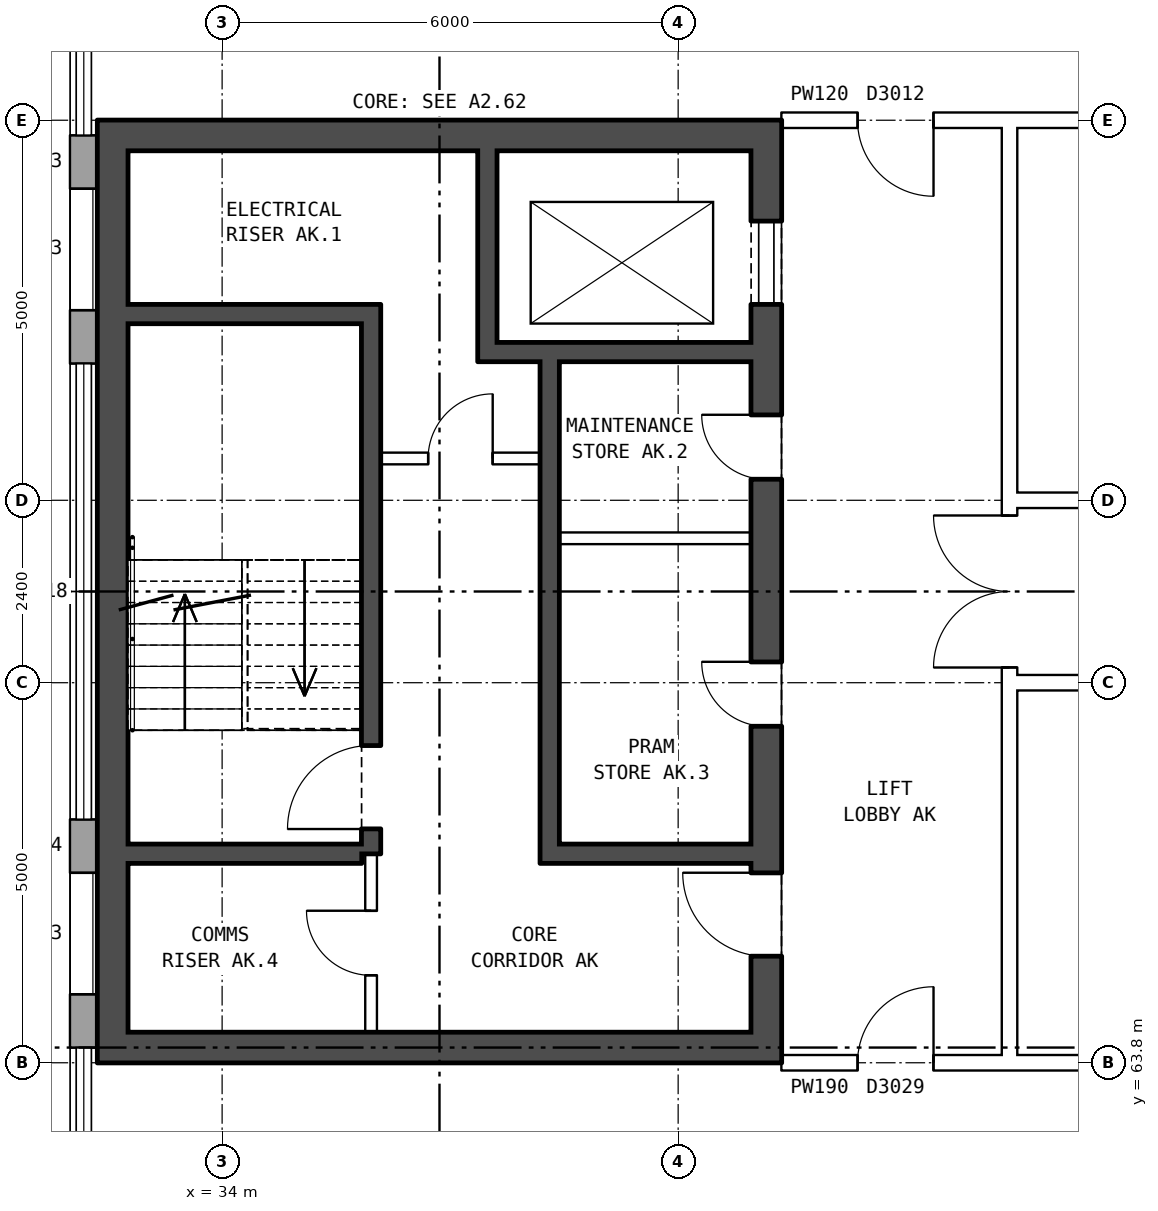
"""IFC4 building model, lengths in metres.
Left out: names, types, materials, properties, quantities, classifications, styles, units other than length and angle.
Written with IfcOpenShell. Run it as: python <this file> out.ifc"""

import sys

from ifc_helpers import new_model, si_unit, direction, frame, frame_2d, origin, place, context, subcontext, project, spatial, rectangle, extrude, element, fill, save


model = new_model("IFC4")
c1 = context("Model", 3, precision=1e-05, world=origin(), true_north=direction((0.0, 1.0)))
c2 = subcontext(c1, "Body", "Model", "MODEL_VIEW")
j1 = project(units=[si_unit("LENGTHUNIT", "METRE"), si_unit("PLANEANGLEUNIT", "RADIAN")], contexts=[c1])
p1 = place(None, origin())
s1 = spatial("IfcSite", under=j1, at=p1, CompositionType="ELEMENT")
p2 = place(p1, origin())
s2 = spatial("IfcBuilding", under=s1, at=p2, CompositionType="ELEMENT")
p3 = place(p2, frame((0.0, 0.0, 215.2)))
s3 = spatial("IfcBuildingStorey", under=s2, at=p3, CompositionType="ELEMENT", Elevation=215.2)
p4 = place(p3, frame((32.18, 76.0, 0.0), z_axis=(0.0, 0.0, 1.0), x_axis=(0.0, -1.0, 0.0)))
e1 = element("IfcWall", 1, at=p4, inside=s3, PredefinedType="STANDARD", context=c2, shape_type="SweptSolid", body=[
    extrude(rectangle(XDim=3.0, YDim=0.36, at=frame_2d((1.5, 0.0))), origin(), (0.0, 0.0, 1.0), 5.6),
])
p5 = place(p4, frame((0.7, 0.0, 3.4)))
e2 = element("IfcOpeningElement", 2, at=p5, cuts=e1, PredefinedType="OPENING", context=c2, shape_type="SweptSolid", body=[
    extrude(rectangle(XDim=1.6, YDim=1.2, at=frame_2d((0.8, 0.6))), frame((0.0, 0.19, 0.0), z_axis=(0.0, -1.0, 0.0), x_axis=(1.0, 0.0, 0.0)), (0.0, 0.0, 1.0), 0.38),
])
p6 = place(p3, frame((32.18, 67.0, 0.0), z_axis=(0.0, 0.0, 1.0), x_axis=(0.0, -1.0, 0.0)))
e3 = element("IfcWall", 3, at=p6, inside=s3, PredefinedType="STANDARD", context=c2, shape_type="SweptSolid", body=[
    extrude(rectangle(XDim=3.0, YDim=0.36, at=frame_2d((1.5, 0.0))), origin(), (0.0, 0.0, 1.0), 5.6),
])
p7 = place(p6, frame((0.7, 0.0, 3.4)))
e4 = element("IfcOpeningElement", 4, at=p7, cuts=e3, PredefinedType="OPENING", context=c2, shape_type="SweptSolid", body=[
    extrude(rectangle(XDim=1.6, YDim=1.2, at=frame_2d((0.8, 0.6))), frame((0.0, 0.19, 0.0), z_axis=(0.0, -1.0, 0.0), x_axis=(1.0, 0.0, 0.0)), (0.0, 0.0, 1.0), 0.38),
])
p8 = place(p3, frame((41.16, 76.2, 0.0), z_axis=(0.0, 0.0, 1.0), x_axis=(0.0, -1.0, 0.0)))
e5 = element("IfcWall", 5, at=p8, inside=s3, PredefinedType="SHEAR", context=c2, shape_type="SweptSolid", body=[
    extrude(rectangle(XDim=12.4, YDim=0.4, at=frame_2d((6.2, 0.0))), origin(), (0.0, 0.0, 1.0), 5.6),
])
p9 = place(p8, frame((1.325, 0.0, 0.0)))
e6 = element("IfcOpeningElement", 6, at=p9, cuts=e5, PredefinedType="OPENING", context=c2, shape_type="SweptSolid", body=[
    extrude(rectangle(XDim=1.1, YDim=2.1, at=frame_2d((0.55, 1.05))), frame((0.0, 0.21, 0.0), z_axis=(0.0, -1.0, 0.0), x_axis=(1.0, 0.0, 0.0)), (0.0, 0.0, 1.0), 0.42),
])
p10 = place(p8, frame((3.875, 0.0, 0.0)))
e7 = element("IfcOpeningElement", 7, at=p10, cuts=e5, PredefinedType="OPENING", context=c2, shape_type="SweptSolid", body=[
    extrude(rectangle(XDim=0.85, YDim=2.1, at=frame_2d((0.425, 1.05))), frame((0.0, 0.21, 0.0), z_axis=(0.0, -1.0, 0.0), x_axis=(1.0, 0.0, 0.0)), (0.0, 0.0, 1.0), 0.42),
])
p11 = place(p8, frame((7.125, 0.0, 0.0)))
e8 = element("IfcOpeningElement", 8, at=p11, cuts=e5, PredefinedType="OPENING", context=c2, shape_type="SweptSolid", body=[
    extrude(rectangle(XDim=0.85, YDim=2.1, at=frame_2d((0.425, 1.05))), frame((0.0, 0.21, 0.0), z_axis=(0.0, -1.0, 0.0), x_axis=(1.0, 0.0, 0.0)), (0.0, 0.0, 1.0), 0.42),
])
p12 = place(p8, frame((9.9, 0.0, 0.0)))
e9 = element("IfcOpeningElement", 9, at=p12, cuts=e5, PredefinedType="OPENING", context=c2, shape_type="SweptSolid", body=[
    extrude(rectangle(XDim=1.1, YDim=2.1, at=frame_2d((0.55, 1.05))), frame((0.0, 0.21, 0.0), z_axis=(0.0, -1.0, 0.0), x_axis=(1.0, 0.0, 0.0)), (0.0, 0.0, 1.0), 0.42),
])
p13 = place(p3, frame((32.56, 76.2, 0.0), z_axis=(0.0, 0.0, 1.0), x_axis=(0.0, -1.0, 0.0)))
e10 = element("IfcWall", 10, at=p13, inside=s3, PredefinedType="SHEAR", context=c2, shape_type="SweptSolid", body=[
    extrude(rectangle(XDim=12.4, YDim=0.4, at=frame_2d((6.2, 0.0))), origin(), (0.0, 0.0, 1.0), 5.6),
])
for number, where, z_axis, x_axis in (
    (11, (40.96, 76.0, 0.0), (0.0, 0.0, 1.0), (-1.0, 0.0, 0.0)),
    (12, (40.96, 64.0, 0.0), (0.0, 0.0, 1.0), (-1.0, 0.0, 0.0)),
):
    element("IfcWall", number, at=place(p3, frame(where, z_axis=z_axis, x_axis=x_axis)), inside=s3, PredefinedType="SHEAR", context=c2, shape_type="SweptSolid", body=[
        extrude(rectangle(XDim=8.2, YDim=0.4, at=frame_2d((4.1, 0.0))), origin(), (0.0, 0.0, 1.0), 5.6),
    ])
p14 = place(p3, frame((35.835, 73.65, 0.0), z_axis=(0.0, 0.0, 1.0), x_axis=(-1.0, 0.0, 0.0)))
e13 = element("IfcWall", 13, at=p14, inside=s3, PredefinedType="SHEAR", context=c2, shape_type="SweptSolid", body=[
    extrude(rectangle(XDim=3.075, YDim=0.25, at=frame_2d((1.538, 0.0))), origin(), (0.0, 0.0, 1.0), 5.6),
])
p15 = place(p3, frame((40.96, 73.15, 0.0), z_axis=(0.0, 0.0, 1.0), x_axis=(-1.0, 0.0, 0.0)))
e14 = element("IfcWall", 14, at=p15, inside=s3, PredefinedType="SHEAR", context=c2, shape_type="SweptSolid", body=[
    extrude(rectangle(XDim=3.595, YDim=0.25, at=frame_2d((1.797, 0.0))), origin(), (0.0, 0.0, 1.0), 5.6),
])
p16 = place(p3, frame((38.185, 71.75, 0.0), z_axis=(0.0, 0.0, 1.0), x_axis=(-1.0, 0.0, 0.0)))
e15 = element("IfcWall", 15, at=p16, inside=s3, PredefinedType="PARTITIONING", context=c2, shape_type="SweptSolid", body=[
    extrude(rectangle(XDim=2.1, YDim=0.15, at=frame_2d((1.05, 0.0))), origin(), (0.0, 0.0, 1.0), 5.6),
])
p17 = place(p16, frame((0.625, 0.0, 0.0)))
e16 = element("IfcOpeningElement", 16, at=p17, cuts=e15, PredefinedType="OPENING", context=c2, shape_type="SweptSolid", body=[
    extrude(rectangle(XDim=0.85, YDim=2.1, at=frame_2d((0.425, 1.05))), frame((0.0, 0.085, 0.0), z_axis=(0.0, -1.0, 0.0), x_axis=(1.0, 0.0, 0.0)), (0.0, 0.0, 1.0), 0.17),
])
p18 = place(p3, frame((40.96, 70.7, 0.0), z_axis=(0.0, 0.0, 1.0), x_axis=(-1.0, 0.0, 0.0)))
e17 = element("IfcWall", 17, at=p18, inside=s3, PredefinedType="PARTITIONING", context=c2, shape_type="SweptSolid", body=[
    extrude(rectangle(XDim=2.525, YDim=0.15, at=frame_2d((1.262, 0.0))), origin(), (0.0, 0.0, 1.0), 5.6),
])
p19 = place(p3, frame((40.96, 66.55, 0.0), z_axis=(0.0, 0.0, 1.0), x_axis=(-1.0, 0.0, 0.0)))
e18 = element("IfcWall", 18, at=p19, inside=s3, PredefinedType="SHEAR", context=c2, shape_type="SweptSolid", body=[
    extrude(rectangle(XDim=2.525, YDim=0.25, at=frame_2d((1.262, 0.0))), origin(), (0.0, 0.0, 1.0), 5.6),
])
p20 = place(p3, frame((35.835, 66.55, 0.0), z_axis=(0.0, 0.0, 1.0), x_axis=(-1.0, 0.0, 0.0)))
e19 = element("IfcWall", 19, at=p20, inside=s3, PredefinedType="SHEAR", context=c2, shape_type="SweptSolid", body=[
    extrude(rectangle(XDim=3.075, YDim=0.25, at=frame_2d((1.538, 0.0))), origin(), (0.0, 0.0, 1.0), 5.6),
])
p21 = place(p3, frame((38.31, 73.025, 0.0), z_axis=(0.0, 0.0, 1.0), x_axis=(0.0, -1.0, 0.0)))
e20 = element("IfcWall", 20, at=p21, inside=s3, PredefinedType="SHEAR", context=c2, shape_type="SweptSolid", body=[
    extrude(rectangle(XDim=6.6, YDim=0.25, at=frame_2d((3.3, 0.0))), origin(), (0.0, 0.0, 1.0), 5.6),
])
p22 = place(p3, frame((37.49, 75.8, 0.0), z_axis=(0.0, 0.0, 1.0), x_axis=(0.0, -1.0, 0.0)))
e21 = element("IfcWall", 21, at=p22, inside=s3, PredefinedType="SHEAR", context=c2, shape_type="SweptSolid", body=[
    extrude(rectangle(XDim=2.525, YDim=0.25, at=frame_2d((1.263, 0.0))), origin(), (0.0, 0.0, 1.0), 5.6),
])
p23 = place(p3, frame((35.96, 73.775, 0.0), z_axis=(0.0, 0.0, 1.0), x_axis=(0.0, -1.0, 0.0)))
e22 = element("IfcWall", 22, at=p23, inside=s3, PredefinedType="SHEAR", context=c2, shape_type="SweptSolid", body=[
    extrude(rectangle(XDim=7.225, YDim=0.25, at=frame_2d((3.612, 0.0))), origin(), (0.0, 0.0, 1.0), 5.6),
])
p24 = place(p23, frame((5.8, 0.0, 0.0)))
e23 = element("IfcOpeningElement", 23, at=p24, cuts=e22, PredefinedType="OPENING", context=c2, shape_type="SweptSolid", body=[
    extrude(rectangle(XDim=1.1, YDim=2.1, at=frame_2d((0.55, 1.05))), frame((0.0, 0.135, 0.0), z_axis=(0.0, -1.0, 0.0), x_axis=(1.0, 0.0, 0.0)), (0.0, 0.0, 1.0), 0.27),
])
p25 = place(p3, frame((35.96, 66.55, 0.0), z_axis=(0.0, 0.0, 1.0), x_axis=(0.0, -1.0, 0.0)))
e24 = element("IfcWall", 24, at=p25, inside=s3, PredefinedType="PARTITIONING", context=c2, shape_type="SweptSolid", body=[
    extrude(rectangle(XDim=2.35, YDim=0.15, at=frame_2d((1.175, 0.0))), origin(), (0.0, 0.0, 1.0), 5.6),
])
p26 = place(p25, frame((0.75, 0.0, 0.0)))
e25 = element("IfcOpeningElement", 25, at=p26, cuts=e24, PredefinedType="OPENING", context=c2, shape_type="SweptSolid", body=[
    extrude(rectangle(XDim=0.85, YDim=2.1, at=frame_2d((0.425, 1.05))), frame((0.0, 0.085, 0.0), z_axis=(0.0, -1.0, 0.0), x_axis=(1.0, 0.0, 0.0)), (0.0, 0.0, 1.0), 0.17),
])
p27 = place(p3, frame((44.36, 63.9, 0.0), z_axis=(0.0, 0.0, 1.0), x_axis=(0.0, 1.0, 0.0)))
e26 = element("IfcWall", 26, at=p27, inside=s3, PredefinedType="PARTITIONING", context=c2, shape_type="SweptSolid", body=[
    extrude(rectangle(XDim=12.2, YDim=0.2, at=frame_2d((6.1, 0.0))), origin(), (0.0, 0.0, 1.0), 5.6),
])
p28 = place(p27, frame((5.1, 0.0, 0.0)))
e27 = element("IfcOpeningElement", 27, at=p28, cuts=e26, PredefinedType="OPENING", context=c2, shape_type="SweptSolid", body=[
    extrude(rectangle(XDim=2.0, YDim=2.1, at=frame_2d((1.0, 1.05))), frame((0.0, 0.11, 0.0), z_axis=(0.0, -1.0, 0.0), x_axis=(1.0, 0.0, 0.0)), (0.0, 0.0, 1.0), 0.22),
])
p29 = place(p3, frame((44.36, 63.8, 0.0), z_axis=(0.0, 0.0, 1.0), x_axis=(1.0, 0.0, 0.0)))
e28 = element("IfcWall", 28, at=p29, inside=s3, PredefinedType="PARTITIONING", context=c2, shape_type="SweptSolid", body=[
    extrude(rectangle(XDim=19.28, YDim=0.2, at=frame_2d((9.64, 0.0))), origin(), (0.0, 0.0, 1.0), 5.6),
])
p30 = place(p29, frame((3.82, 0.0, 0.0)))
e29 = element("IfcOpeningElement", 29, at=p30, cuts=e28, PredefinedType="OPENING", context=c2, shape_type="SweptSolid", body=[
    extrude(rectangle(XDim=1.0, YDim=2.1, at=frame_2d((0.5, 1.05))), frame((0.0, 0.11, 0.0), z_axis=(0.0, -1.0, 0.0), x_axis=(1.0, 0.0, 0.0)), (0.0, 0.0, 1.0), 0.22),
])
p31 = place(p29, frame((13.46, 0.0, 0.0)))
e30 = element("IfcOpeningElement", 30, at=p31, cuts=e28, PredefinedType="OPENING", context=c2, shape_type="SweptSolid", body=[
    extrude(rectangle(XDim=1.0, YDim=2.1, at=frame_2d((0.5, 1.05))), frame((0.0, 0.11, 0.0), z_axis=(0.0, -1.0, 0.0), x_axis=(1.0, 0.0, 0.0)), (0.0, 0.0, 1.0), 0.22),
])
p32 = place(p3, frame((41.36, 63.8, 0.0), z_axis=(0.0, 0.0, 1.0), x_axis=(1.0, 0.0, 0.0)))
e31 = element("IfcWall", 31, at=p32, inside=s3, PredefinedType="PARTITIONING", context=c2, shape_type="SweptSolid", body=[
    extrude(rectangle(XDim=3.0, YDim=0.2, at=frame_2d((1.5, 0.0))), origin(), (0.0, 0.0, 1.0), 5.6),
])
p33 = place(p32, frame((1.0, 0.0, 0.0)))
e32 = element("IfcOpeningElement", 32, at=p33, cuts=e31, PredefinedType="OPENING", context=c2, shape_type="SweptSolid", body=[
    extrude(rectangle(XDim=1.0, YDim=2.1, at=frame_2d((0.5, 1.05))), frame((0.0, 0.11, 0.0), z_axis=(0.0, -1.0, 0.0), x_axis=(1.0, 0.0, 0.0)), (0.0, 0.0, 1.0), 0.22),
])
for number, where, z_axis, x_axis in (
    (33, (44.36, 68.8, 0.0), (0.0, 0.0, 1.0), (1.0, 0.0, 0.0)),
    (34, (44.36, 71.2, 0.0), (0.0, 0.0, 1.0), (1.0, 0.0, 0.0)),
):
    element("IfcWall", number, at=place(p3, frame(where, z_axis=z_axis, x_axis=x_axis)), inside=s3, PredefinedType="PARTITIONING", context=c2, shape_type="SweptSolid", body=[
        extrude(rectangle(XDim=19.28, YDim=0.2, at=frame_2d((9.64, 0.0))), origin(), (0.0, 0.0, 1.0), 5.6),
    ])
p34 = place(p3, frame((44.36, 76.2, 0.0), z_axis=(0.0, 0.0, 1.0), x_axis=(1.0, 0.0, 0.0)))
e35 = element("IfcWall", 35, at=p34, inside=s3, PredefinedType="PARTITIONING", context=c2, shape_type="SweptSolid", body=[
    extrude(rectangle(XDim=19.28, YDim=0.2, at=frame_2d((9.64, 0.0))), origin(), (0.0, 0.0, 1.0), 5.6),
])
p35 = place(p34, frame((4.82, 0.0, 0.0)))
e36 = element("IfcOpeningElement", 36, at=p35, cuts=e35, PredefinedType="OPENING", context=c2, shape_type="SweptSolid", body=[
    extrude(rectangle(XDim=1.0, YDim=2.1, at=frame_2d((0.5, 1.05))), frame((0.0, 0.11, 0.0), z_axis=(0.0, -1.0, 0.0), x_axis=(1.0, 0.0, 0.0)), (0.0, 0.0, 1.0), 0.22),
])
p36 = place(p34, frame((14.46, 0.0, 0.0)))
e37 = element("IfcOpeningElement", 37, at=p36, cuts=e35, PredefinedType="OPENING", context=c2, shape_type="SweptSolid", body=[
    extrude(rectangle(XDim=1.0, YDim=2.1, at=frame_2d((0.5, 1.05))), frame((0.0, 0.11, 0.0), z_axis=(0.0, -1.0, 0.0), x_axis=(1.0, 0.0, 0.0)), (0.0, 0.0, 1.0), 0.22),
])
p37 = place(p3, frame((41.36, 76.2, 0.0), z_axis=(0.0, 0.0, 1.0), x_axis=(1.0, 0.0, 0.0)))
e38 = element("IfcWall", 38, at=p37, inside=s3, PredefinedType="PARTITIONING", context=c2, shape_type="SweptSolid", body=[
    extrude(rectangle(XDim=3.0, YDim=0.2, at=frame_2d((1.5, 0.0))), origin(), (0.0, 0.0, 1.0), 5.6),
])
p38 = place(p37, frame((1.0, 0.0, 0.0)))
e39 = element("IfcOpeningElement", 39, at=p38, cuts=e38, PredefinedType="OPENING", context=c2, shape_type="SweptSolid", body=[
    extrude(rectangle(XDim=1.0, YDim=2.1, at=frame_2d((0.5, 1.05))), frame((0.0, 0.11, 0.0), z_axis=(0.0, -1.0, 0.0), x_axis=(1.0, 0.0, 0.0)), (0.0, 0.0, 1.0), 0.22),
])
p39 = place(p5, origin())
e40 = element("IfcWindow", 40, at=p39, inside=s3, PartitioningType="DOUBLE_PANEL_HORIZONTAL", PredefinedType="WINDOW", context=c2, shape_type="SweptSolid", body=[
    extrude(rectangle(XDim=1.6, YDim=1.2, at=frame_2d((0.8, 0.6))), frame((0.0, 0.15, 0.0), z_axis=(0.0, -1.0, 0.0), x_axis=(1.0, 0.0, 0.0)), (0.0, 0.0, 1.0), 0.06),
])
fill(e2, e40)
p40 = place(p7, origin())
e41 = element("IfcWindow", 41, at=p40, inside=s3, PartitioningType="DOUBLE_PANEL_HORIZONTAL", PredefinedType="WINDOW", context=c2, shape_type="SweptSolid", body=[
    extrude(rectangle(XDim=1.6, YDim=1.2, at=frame_2d((0.8, 0.6))), frame((0.0, 0.15, 0.0), z_axis=(0.0, -1.0, 0.0), x_axis=(1.0, 0.0, 0.0)), (0.0, 0.0, 1.0), 0.06),
])
fill(e4, e41)
p41 = place(p9, origin())
e42 = element("IfcDoor", 42, at=p41, inside=s3, OperationType="DOUBLE_DOOR_SLIDING", PredefinedType="DOOR", context=c2, shape_type="SweptSolid", body=[
    extrude(rectangle(XDim=1.1, YDim=2.1, at=frame_2d((0.55, 1.05))), frame((0.0, -0.135, 0.0), z_axis=(0.0, -1.0, 0.0), x_axis=(1.0, 0.0, 0.0)), (0.0, 0.0, 1.0), 0.05),
])
fill(e6, e42)
p42 = place(p10, frame((0.85, 0.0, 0.0), z_axis=(0.0, 0.0, 1.0), x_axis=(-1.0, 0.0, 0.0)))
e43 = element("IfcDoor", 43, at=p42, inside=s3, OperationType="SINGLE_SWING_RIGHT", PredefinedType="DOOR", context=c2, shape_type="SweptSolid", body=[
    extrude(rectangle(XDim=0.85, YDim=2.1, at=frame_2d((0.425, 1.05))), frame((0.0, 0.185, 0.0), z_axis=(0.0, -1.0, 0.0), x_axis=(1.0, 0.0, 0.0)), (0.0, 0.0, 1.0), 0.05),
])
fill(e7, e43)
p43 = place(p11, frame((0.85, 0.0, 0.0), z_axis=(0.0, 0.0, 1.0), x_axis=(-1.0, 0.0, 0.0)))
e44 = element("IfcDoor", 44, at=p43, inside=s3, OperationType="SINGLE_SWING_RIGHT", PredefinedType="DOOR", context=c2, shape_type="SweptSolid", body=[
    extrude(rectangle(XDim=0.85, YDim=2.1, at=frame_2d((0.425, 1.05))), frame((0.0, 0.185, 0.0), z_axis=(0.0, -1.0, 0.0), x_axis=(1.0, 0.0, 0.0)), (0.0, 0.0, 1.0), 0.05),
])
fill(e8, e44)
p44 = place(p12, frame((1.1, 0.0, 0.0), z_axis=(0.0, 0.0, 1.0), x_axis=(-1.0, 0.0, 0.0)))
e45 = element("IfcDoor", 45, at=p44, inside=s3, OperationType="SINGLE_SWING_RIGHT", PredefinedType="DOOR", context=c2, shape_type="SweptSolid", body=[
    extrude(rectangle(XDim=1.1, YDim=2.1, at=frame_2d((0.55, 1.05))), frame((0.0, 0.185, 0.0), z_axis=(0.0, -1.0, 0.0), x_axis=(1.0, 0.0, 0.0)), (0.0, 0.0, 1.0), 0.05),
])
fill(e9, e45)
p45 = place(p24, frame((1.1, 0.0, 0.0), z_axis=(0.0, 0.0, 1.0), x_axis=(-1.0, 0.0, 0.0)))
e46 = element("IfcDoor", 46, at=p45, inside=s3, OperationType="SINGLE_SWING_LEFT", PredefinedType="DOOR", context=c2, shape_type="SweptSolid", body=[
    extrude(rectangle(XDim=1.1, YDim=2.1, at=frame_2d((0.55, 1.05))), frame((0.0, 0.025, 0.0), z_axis=(0.0, -1.0, 0.0), x_axis=(1.0, 0.0, 0.0)), (0.0, 0.0, 1.0), 0.05),
])
fill(e23, e46)
p46 = place(p17, frame((0.85, 0.0, 0.0), z_axis=(0.0, 0.0, 1.0), x_axis=(-1.0, 0.0, 0.0)))
e47 = element("IfcDoor", 47, at=p46, inside=s3, OperationType="SINGLE_SWING_RIGHT", PredefinedType="DOOR", context=c2, shape_type="SweptSolid", body=[
    extrude(rectangle(XDim=0.85, YDim=2.1, at=frame_2d((0.425, 1.05))), frame((0.0, 0.025, 0.0), z_axis=(0.0, -1.0, 0.0), x_axis=(1.0, 0.0, 0.0)), (0.0, 0.0, 1.0), 0.05),
])
fill(e16, e47)
p47 = place(p26, frame((0.85, 0.0, 0.0), z_axis=(0.0, 0.0, 1.0), x_axis=(-1.0, 0.0, 0.0)))
e48 = element("IfcDoor", 48, at=p47, inside=s3, OperationType="SINGLE_SWING_RIGHT", PredefinedType="DOOR", context=c2, shape_type="SweptSolid", body=[
    extrude(rectangle(XDim=0.85, YDim=2.1, at=frame_2d((0.425, 1.05))), frame((0.0, 0.025, 0.0), z_axis=(0.0, -1.0, 0.0), x_axis=(1.0, 0.0, 0.0)), (0.0, 0.0, 1.0), 0.05),
])
fill(e25, e48)
p48 = place(p28, origin())
e49 = element("IfcDoor", 49, at=p48, inside=s3, OperationType="DOUBLE_DOOR_SINGLE_SWING", PredefinedType="DOOR", context=c2, shape_type="SweptSolid", body=[
    extrude(rectangle(XDim=2.0, YDim=2.1, at=frame_2d((1.0, 1.05))), frame((0.0, 0.025, 0.0), z_axis=(0.0, -1.0, 0.0), x_axis=(1.0, 0.0, 0.0)), (0.0, 0.0, 1.0), 0.05),
])
fill(e27, e49)
p49 = place(p33, origin())
e50 = element("IfcDoor", 50, at=p49, inside=s3, OperationType="SINGLE_SWING_RIGHT", PredefinedType="DOOR", context=c2, shape_type="SweptSolid", body=[
    extrude(rectangle(XDim=1.0, YDim=2.1, at=frame_2d((0.5, 1.05))), frame((0.0, 0.025, 0.0), z_axis=(0.0, -1.0, 0.0), x_axis=(1.0, 0.0, 0.0)), (0.0, 0.0, 1.0), 0.05),
])
fill(e32, e50)
p50 = place(p38, frame((1.0, 0.0, 0.0), z_axis=(0.0, 0.0, 1.0), x_axis=(-1.0, 0.0, 0.0)))
e51 = element("IfcDoor", 51, at=p50, inside=s3, OperationType="SINGLE_SWING_LEFT", PredefinedType="DOOR", context=c2, shape_type="SweptSolid", body=[
    extrude(rectangle(XDim=1.0, YDim=2.1, at=frame_2d((0.5, 1.05))), frame((0.0, 0.025, 0.0), z_axis=(0.0, -1.0, 0.0), x_axis=(1.0, 0.0, 0.0)), (0.0, 0.0, 1.0), 0.05),
])
fill(e39, e51)
save(model, sys.argv[1])
